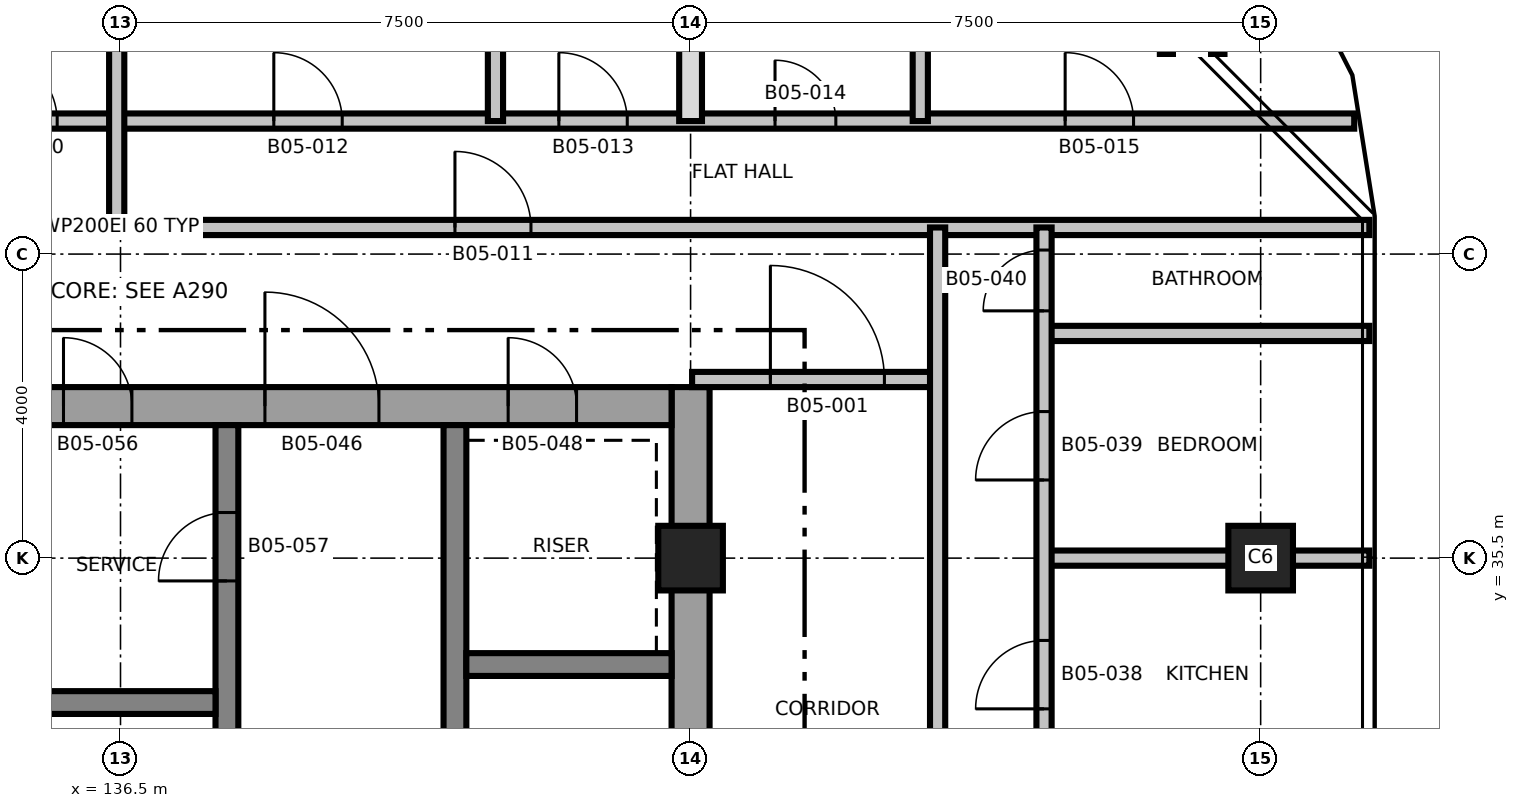
"""IFC4 building model, lengths in metres.
Left out: names, types, materials, properties, quantities, classifications, styles, units other than length and angle.
Written with IfcOpenShell. Run it as: python <this file> out.ifc"""

import sys

from ifc_helpers import new_model, si_unit, direction, frame, frame_2d, origin, origin_2d, place, context, subcontext, project, spatial, rectangle, extrude, element, fill, save


model = new_model("IFC4")
c1 = context("Model", 3, precision=1e-05, world=origin(), true_north=direction((0.0, 1.0)))
c2 = subcontext(c1, "Body", "Model", "MODEL_VIEW")
j1 = project(units=[si_unit("LENGTHUNIT", "METRE"), si_unit("PLANEANGLEUNIT", "RADIAN")], contexts=[c1])
p1 = place(None, origin())
s1 = spatial("IfcSite", under=j1, at=p1, CompositionType="ELEMENT")
p2 = place(p1, origin())
s2 = spatial("IfcBuilding", under=s1, at=p2, CompositionType="ELEMENT")
p3 = place(p2, frame((0.0, 0.0, 70.5)))
s3 = spatial("IfcBuildingStorey", under=s2, at=p3, CompositionType="ELEMENT", Elevation=70.5)
p4 = place(p3, frame((144.0, 24.25, 0.0), z_axis=(0.0, 0.0, 1.0), x_axis=(0.0, 1.0, 0.0)))
e1 = element("IfcWall", 1, at=p4, inside=s3, PredefinedType="SHEAR", context=c2, shape_type="SweptSolid", body=[
    extrude(rectangle(XDim=13.5, YDim=0.5, at=frame_2d((6.75, 0.0))), origin(), (0.0, 0.0, 1.0), 3.7),
])
p5 = place(p3, frame((128.75, 37.5, 0.0), z_axis=(0.0, 0.0, 1.0), x_axis=(1.0, 0.0, 0.0)))
e2 = element("IfcWall", 2, at=p5, inside=s3, PredefinedType="SHEAR", context=c2, shape_type="SweptSolid", body=[
    extrude(rectangle(XDim=15.0, YDim=0.5, at=frame_2d((7.5, 0.0))), origin(), (0.0, 0.0, 1.0), 3.7),
])
p6 = place(p5, frame((9.65, 0.0, 0.0)))
e3 = element("IfcOpeningElement", 3, at=p6, cuts=e2, PredefinedType="OPENING", context=c2, shape_type="SweptSolid", body=[
    extrude(rectangle(XDim=1.5, YDim=2.1, at=frame_2d((0.75, 1.05))), frame((0.0, 0.26, 0.0), z_axis=(0.0, -1.0, 0.0), x_axis=(1.0, 0.0, 0.0)), (0.0, 0.0, 1.0), 0.52),
])
p7 = place(p5, frame((12.85, 0.0, 0.0)))
e4 = element("IfcOpeningElement", 4, at=p7, cuts=e2, PredefinedType="OPENING", context=c2, shape_type="SweptSolid", body=[
    extrude(rectangle(XDim=0.9, YDim=2.1, at=frame_2d((0.45, 1.05))), frame((0.0, 0.26, 0.0), z_axis=(0.0, -1.0, 0.0), x_axis=(1.0, 0.0, 0.0)), (0.0, 0.0, 1.0), 0.52),
])
p8 = place(p5, frame((4.1, 0.0, 0.0)))
e5 = element("IfcOpeningElement", 5, at=p8, cuts=e2, PredefinedType="OPENING", context=c2, shape_type="SweptSolid", body=[
    extrude(rectangle(XDim=0.9, YDim=2.1, at=frame_2d((0.45, 1.05))), frame((0.0, 0.26, 0.0), z_axis=(0.0, -1.0, 0.0), x_axis=(1.0, 0.0, 0.0)), (0.0, 0.0, 1.0), 0.52),
])
p9 = place(p5, frame((7.0, 0.0, 0.0)))
e6 = element("IfcOpeningElement", 6, at=p9, cuts=e2, PredefinedType="OPENING", context=c2, shape_type="SweptSolid", body=[
    extrude(rectangle(XDim=0.9, YDim=2.1, at=frame_2d((0.45, 1.05))), frame((0.0, 0.26, 0.0), z_axis=(0.0, -1.0, 0.0), x_axis=(1.0, 0.0, 0.0)), (0.0, 0.0, 1.0), 0.52),
])
p10 = place(p3, frame((137.9, 24.75, 0.0), z_axis=(0.0, 0.0, 1.0), x_axis=(0.0, 1.0, 0.0)))
e7 = element("IfcWall", 7, at=p10, inside=s3, PredefinedType="SHEAR", context=c2, shape_type="SweptSolid", body=[
    extrude(rectangle(XDim=12.5, YDim=0.3, at=frame_2d((6.25, 0.0))), origin(), (0.0, 0.0, 1.0), 3.7),
])
p11 = place(p10, frame((3.95, 0.0, 0.0)))
e8 = element("IfcOpeningElement", 8, at=p11, cuts=e7, PredefinedType="OPENING", context=c2, shape_type="SweptSolid", body=[
    extrude(rectangle(XDim=1.5, YDim=2.1, at=frame_2d((0.75, 1.05))), frame((0.0, 0.16, 0.0), z_axis=(0.0, -1.0, 0.0), x_axis=(1.0, 0.0, 0.0)), (0.0, 0.0, 1.0), 0.32),
])
p12 = place(p10, frame((10.45, 0.0, 0.0)))
e9 = element("IfcOpeningElement", 9, at=p12, cuts=e7, PredefinedType="OPENING", context=c2, shape_type="SweptSolid", body=[
    extrude(rectangle(XDim=0.9, YDim=2.1, at=frame_2d((0.45, 1.05))), frame((0.0, 0.16, 0.0), z_axis=(0.0, -1.0, 0.0), x_axis=(1.0, 0.0, 0.0)), (0.0, 0.0, 1.0), 0.32),
])
p13 = place(p3, frame((140.9, 24.75, 0.0), z_axis=(0.0, 0.0, 1.0), x_axis=(0.0, 1.0, 0.0)))
e10 = element("IfcWall", 10, at=p13, inside=s3, PredefinedType="SHEAR", context=c2, shape_type="SweptSolid", body=[
    extrude(rectangle(XDim=12.5, YDim=0.3, at=frame_2d((6.25, 0.0))), origin(), (0.0, 0.0, 1.0), 3.7),
])
p14 = place(p13, frame((5.9, 0.0, 0.0)))
e11 = element("IfcOpeningElement", 11, at=p14, cuts=e10, PredefinedType="OPENING", context=c2, shape_type="SweptSolid", body=[
    extrude(rectangle(XDim=1.2, YDim=2.1, at=frame_2d((0.6, 1.05))), frame((0.0, 0.16, 0.0), z_axis=(0.0, -1.0, 0.0), x_axis=(1.0, 0.0, 0.0)), (0.0, 0.0, 1.0), 0.32),
])
p15 = place(p3, frame((132.25, 33.6, 0.0), z_axis=(0.0, 0.0, 1.0), x_axis=(1.0, 0.0, 0.0)))
e12 = element("IfcWall", 12, at=p15, inside=s3, PredefinedType="SHEAR", context=c2, shape_type="SweptSolid", body=[
    extrude(rectangle(XDim=5.5, YDim=0.3, at=frame_2d((2.75, 0.0))), origin(), (0.0, 0.0, 1.0), 3.7),
])
p16 = place(p3, frame((141.05, 34.1, 0.0), z_axis=(0.0, 0.0, 1.0), x_axis=(1.0, 0.0, 0.0)))
e13 = element("IfcWall", 13, at=p16, inside=s3, PredefinedType="SHEAR", context=c2, shape_type="SweptSolid", body=[
    extrude(rectangle(XDim=2.7, YDim=0.3, at=frame_2d((1.35, 0.0))), origin(), (0.0, 0.0, 1.0), 3.7),
])
for number, where, z_axis, x_axis in (
    (14, (144.0, 35.5, 0.0), (0.0, 0.0, 1.0), (1.0, 0.0, 0.0)),
    (15, (151.5, 35.5, 0.0), (0.0, 0.0, 1.0), (1.0, 0.0, 0.0)),
    (16, (150.599, 42.558, 0.0), (0.0, 0.0, 1.0), (1.0, 0.0, 0.0)),
):
    element("IfcColumn", number, at=place(p3, frame(where, z_axis=z_axis, x_axis=x_axis)), inside=s3, PredefinedType="COLUMN", context=c2, shape_type="SweptSolid", body=[
        extrude(rectangle(XDim=0.85, YDim=0.85, at=origin_2d()), origin(), (0.0, 0.0, 1.0), 3.7),
    ])
p17 = place(p3, frame((148.65, 35.5, 0.0), z_axis=(0.0, 0.0, 1.0), x_axis=(1.0, 0.0, 0.0)))
e17 = element("IfcWall", 17, at=p17, inside=s3, PredefinedType="PARTITIONING", context=c2, shape_type="SweptSolid", body=[
    extrude(rectangle(XDim=4.28, YDim=0.2, at=frame_2d((2.14, 0.0))), origin(), (0.0, 0.0, 1.0), 3.4),
])
p18 = place(p3, frame((144.02, 37.85, 0.0), z_axis=(0.0, 0.0, 1.0), x_axis=(1.0, 0.0, 0.0)))
e18 = element("IfcWall", 18, at=p18, inside=s3, PredefinedType="PARTITIONING", context=c2, shape_type="SweptSolid", body=[
    extrude(rectangle(XDim=3.23, YDim=0.2, at=frame_2d((1.615, 0.0))), origin(), (0.0, 0.0, 1.0), 3.4),
])
p19 = place(p18, frame((1.03, 0.0, 0.0)))
e19 = element("IfcOpeningElement", 19, at=p19, cuts=e18, PredefinedType="OPENING", context=c2, shape_type="SweptSolid", body=[
    extrude(rectangle(XDim=1.5, YDim=2.1, at=frame_2d((0.75, 1.05))), frame((0.0, 0.11, 0.0), z_axis=(0.0, -1.0, 0.0), x_axis=(1.0, 0.0, 0.0)), (0.0, 0.0, 1.0), 0.22),
])
p20 = place(p3, frame((148.65, 38.456, 0.0), z_axis=(0.0, 0.0, 1.0), x_axis=(1.0, 0.0, 0.0)))
e20 = element("IfcWall", 20, at=p20, inside=s3, PredefinedType="PARTITIONING", context=c2, shape_type="SweptSolid", body=[
    extrude(rectangle(XDim=4.28, YDim=0.2, at=frame_2d((2.14, 0.0))), origin(), (0.0, 0.0, 1.0), 3.4),
])
p21 = place(p3, frame((120.07, 39.85, 0.0), z_axis=(0.0, 0.0, 1.0), x_axis=(1.0, 0.0, 0.0)))
e21 = element("IfcWall", 21, at=p21, inside=s3, PredefinedType="PARTITIONING", context=c2, shape_type="SweptSolid", body=[
    extrude(rectangle(XDim=32.86, YDim=0.2, at=frame_2d((16.43, 0.0))), origin(), (0.0, 0.0, 1.0), 3.4),
])
p22 = place(p21, frame((11.03, 0.0, 0.0)))
e22 = element("IfcOpeningElement", 22, at=p22, cuts=e21, PredefinedType="OPENING", context=c2, shape_type="SweptSolid", body=[
    extrude(rectangle(XDim=1.0, YDim=2.1, at=frame_2d((0.5, 1.05))), frame((0.0, 0.11, 0.0), z_axis=(0.0, -1.0, 0.0), x_axis=(1.0, 0.0, 0.0)), (0.0, 0.0, 1.0), 0.22),
])
p23 = place(p21, frame((20.83, 0.0, 0.0)))
e23 = element("IfcOpeningElement", 23, at=p23, cuts=e21, PredefinedType="OPENING", context=c2, shape_type="SweptSolid", body=[
    extrude(rectangle(XDim=1.0, YDim=2.1, at=frame_2d((0.5, 1.05))), frame((0.0, 0.11, 0.0), z_axis=(0.0, -1.0, 0.0), x_axis=(1.0, 0.0, 0.0)), (0.0, 0.0, 1.0), 0.22),
])
p24 = place(p3, frame((120.269, 41.25, 0.0), z_axis=(0.0, 0.0, 1.0), x_axis=(1.0, 0.0, 0.0)))
e24 = element("IfcWall", 24, at=p24, inside=s3, PredefinedType="PARTITIONING", context=c2, shape_type="SweptSolid", body=[
    extrude(rectangle(XDim=32.462, YDim=0.2, at=frame_2d((16.231, 0.0))), origin(), (0.0, 0.0, 1.0), 3.4),
])
p25 = place(p24, frame((0.414, 0.0, 0.0)))
e25 = element("IfcOpeningElement", 25, at=p25, cuts=e24, PredefinedType="OPENING", context=c2, shape_type="SweptSolid", body=[
    extrude(rectangle(XDim=0.9, YDim=2.1, at=frame_2d((0.45, 1.05))), frame((0.0, 0.11, 0.0), z_axis=(0.0, -1.0, 0.0), x_axis=(1.0, 0.0, 0.0)), (0.0, 0.0, 1.0), 0.22),
])
p26 = place(p24, frame((4.581, 0.0, 0.0)))
e26 = element("IfcOpeningElement", 26, at=p26, cuts=e24, PredefinedType="OPENING", context=c2, shape_type="SweptSolid", body=[
    extrude(rectangle(XDim=0.9, YDim=2.1, at=frame_2d((0.45, 1.05))), frame((0.0, 0.11, 0.0), z_axis=(0.0, -1.0, 0.0), x_axis=(1.0, 0.0, 0.0)), (0.0, 0.0, 1.0), 0.22),
])
p27 = place(p24, frame((7.381, 0.0, 0.0)))
e27 = element("IfcOpeningElement", 27, at=p27, cuts=e24, PredefinedType="OPENING", context=c2, shape_type="SweptSolid", body=[
    extrude(rectangle(XDim=0.8, YDim=2.1, at=frame_2d((0.4, 1.05))), frame((0.0, 0.11, 0.0), z_axis=(0.0, -1.0, 0.0), x_axis=(1.0, 0.0, 0.0)), (0.0, 0.0, 1.0), 0.22),
])
p28 = place(p24, frame((10.748, 0.0, 0.0)))
e28 = element("IfcOpeningElement", 28, at=p28, cuts=e24, PredefinedType="OPENING", context=c2, shape_type="SweptSolid", body=[
    extrude(rectangle(XDim=0.9, YDim=2.1, at=frame_2d((0.45, 1.05))), frame((0.0, 0.11, 0.0), z_axis=(0.0, -1.0, 0.0), x_axis=(1.0, 0.0, 0.0)), (0.0, 0.0, 1.0), 0.22),
])
p29 = place(p24, frame((14.498, 0.0, 0.0)))
e29 = element("IfcOpeningElement", 29, at=p29, cuts=e24, PredefinedType="OPENING", context=c2, shape_type="SweptSolid", body=[
    extrude(rectangle(XDim=0.9, YDim=2.1, at=frame_2d((0.45, 1.05))), frame((0.0, 0.11, 0.0), z_axis=(0.0, -1.0, 0.0), x_axis=(1.0, 0.0, 0.0)), (0.0, 0.0, 1.0), 0.22),
])
p30 = place(p24, frame((18.248, 0.0, 0.0)))
e30 = element("IfcOpeningElement", 30, at=p30, cuts=e24, PredefinedType="OPENING", context=c2, shape_type="SweptSolid", body=[
    extrude(rectangle(XDim=0.9, YDim=2.1, at=frame_2d((0.45, 1.05))), frame((0.0, 0.11, 0.0), z_axis=(0.0, -1.0, 0.0), x_axis=(1.0, 0.0, 0.0)), (0.0, 0.0, 1.0), 0.22),
])
p31 = place(p24, frame((21.998, 0.0, 0.0)))
e31 = element("IfcOpeningElement", 31, at=p31, cuts=e24, PredefinedType="OPENING", context=c2, shape_type="SweptSolid", body=[
    extrude(rectangle(XDim=0.9, YDim=2.1, at=frame_2d((0.45, 1.05))), frame((0.0, 0.11, 0.0), z_axis=(0.0, -1.0, 0.0), x_axis=(1.0, 0.0, 0.0)), (0.0, 0.0, 1.0), 0.22),
])
p32 = place(p24, frame((24.842, 0.0, 0.0)))
e32 = element("IfcOpeningElement", 32, at=p32, cuts=e24, PredefinedType="OPENING", context=c2, shape_type="SweptSolid", body=[
    extrude(rectangle(XDim=0.8, YDim=2.1, at=frame_2d((0.4, 1.05))), frame((0.0, 0.11, 0.0), z_axis=(0.0, -1.0, 0.0), x_axis=(1.0, 0.0, 0.0)), (0.0, 0.0, 1.0), 0.22),
])
p33 = place(p24, frame((28.659, 0.0, 0.0)))
e33 = element("IfcOpeningElement", 33, at=p33, cuts=e24, PredefinedType="OPENING", context=c2, shape_type="SweptSolid", body=[
    extrude(rectangle(XDim=0.9, YDim=2.1, at=frame_2d((0.45, 1.05))), frame((0.0, 0.11, 0.0), z_axis=(0.0, -1.0, 0.0), x_axis=(1.0, 0.0, 0.0)), (0.0, 0.0, 1.0), 0.22),
])
p34 = place(p3, frame((136.45, 39.85, 0.0), z_axis=(0.0, 0.0, 1.0), x_axis=(0.0, 1.0, 0.0)))
e34 = element("IfcWall", 34, at=p34, inside=s3, PredefinedType="PARTITIONING", context=c2, shape_type="SweptSolid", body=[
    extrude(rectangle(XDim=6.08, YDim=0.2, at=frame_2d((3.04, 0.0))), origin(), (0.0, 0.0, 1.0), 3.4),
])
p35 = place(p3, frame((141.433, 41.25, 0.0), z_axis=(0.0, 0.0, 1.0), x_axis=(0.0, 1.0, 0.0)))
e35 = element("IfcWall", 35, at=p35, inside=s3, PredefinedType="PARTITIONING", context=c2, shape_type="SweptSolid", body=[
    extrude(rectangle(XDim=4.68, YDim=0.2, at=frame_2d((2.34, 0.0))), origin(), (0.0, 0.0, 1.0), 3.4),
])
p36 = place(p3, frame((144.0, 41.25, 0.0), z_axis=(0.0, 0.0, 1.0), x_axis=(0.0, 1.0, 0.0)))
e36 = element("IfcWall", 36, at=p36, inside=s3, PredefinedType="PARTITIONING", context=c2, shape_type="SweptSolid", body=[
    extrude(rectangle(XDim=4.68, YDim=0.3, at=frame_2d((2.34, 0.0))), origin(), (0.0, 0.0, 1.0), 3.4),
])
p37 = place(p3, frame((147.022, 41.25, 0.0), z_axis=(0.0, 0.0, 1.0), x_axis=(0.0, 1.0, 0.0)))
e37 = element("IfcWall", 37, at=p37, inside=s3, PredefinedType="PARTITIONING", context=c2, shape_type="SweptSolid", body=[
    extrude(rectangle(XDim=4.676, YDim=0.2, at=frame_2d((2.338, 0.0))), origin(), (0.0, 0.0, 1.0), 3.4),
])
p38 = place(p3, frame((147.25, 22.15, 0.0), z_axis=(0.0, 0.0, 1.0), x_axis=(0.0, 1.0, 0.0)))
e38 = element("IfcWall", 38, at=p38, inside=s3, PredefinedType="PARTITIONING", context=c2, shape_type="SweptSolid", body=[
    extrude(rectangle(XDim=17.7, YDim=0.2, at=frame_2d((8.85, 0.0))), origin(), (0.0, 0.0, 1.0), 3.4),
])
p39 = place(p38, frame((2.65, 0.0, 0.0)))
e39 = element("IfcOpeningElement", 39, at=p39, cuts=e38, PredefinedType="OPENING", context=c2, shape_type="SweptSolid", body=[
    extrude(rectangle(XDim=1.0, YDim=2.1, at=frame_2d((0.5, 1.05))), frame((0.0, 0.11, 0.0), z_axis=(0.0, -1.0, 0.0), x_axis=(1.0, 0.0, 0.0)), (0.0, 0.0, 1.0), 0.22),
])
p40 = place(p3, frame((148.65, 22.15, 0.0), z_axis=(0.0, 0.0, 1.0), x_axis=(0.0, 1.0, 0.0)))
e40 = element("IfcWall", 40, at=p40, inside=s3, PredefinedType="PARTITIONING", context=c2, shape_type="SweptSolid", body=[
    extrude(rectangle(XDim=17.7, YDim=0.2, at=frame_2d((8.85, 0.0))), origin(), (0.0, 0.0, 1.0), 3.4),
])
p41 = place(p40, frame((1.725, 0.0, 0.0)))
e41 = element("IfcOpeningElement", 41, at=p41, cuts=e40, PredefinedType="OPENING", context=c2, shape_type="SweptSolid", body=[
    extrude(rectangle(XDim=0.9, YDim=2.1, at=frame_2d((0.45, 1.05))), frame((0.0, 0.11, 0.0), z_axis=(0.0, -1.0, 0.0), x_axis=(1.0, 0.0, 0.0)), (0.0, 0.0, 1.0), 0.22),
])
p42 = place(p40, frame((6.867, 0.0, 0.0)))
e42 = element("IfcOpeningElement", 42, at=p42, cuts=e40, PredefinedType="OPENING", context=c2, shape_type="SweptSolid", body=[
    extrude(rectangle(XDim=0.9, YDim=2.1, at=frame_2d((0.45, 1.05))), frame((0.0, 0.11, 0.0), z_axis=(0.0, -1.0, 0.0), x_axis=(1.0, 0.0, 0.0)), (0.0, 0.0, 1.0), 0.22),
])
p43 = place(p40, frame((11.367, 0.0, 0.0)))
e43 = element("IfcOpeningElement", 43, at=p43, cuts=e40, PredefinedType="OPENING", context=c2, shape_type="SweptSolid", body=[
    extrude(rectangle(XDim=0.9, YDim=2.1, at=frame_2d((0.45, 1.05))), frame((0.0, 0.11, 0.0), z_axis=(0.0, -1.0, 0.0), x_axis=(1.0, 0.0, 0.0)), (0.0, 0.0, 1.0), 0.22),
])
p44 = place(p40, frame((14.378, 0.0, 0.0)))
e44 = element("IfcOpeningElement", 44, at=p44, cuts=e40, PredefinedType="OPENING", context=c2, shape_type="SweptSolid", body=[
    extrude(rectangle(XDim=0.9, YDim=2.1, at=frame_2d((0.45, 1.05))), frame((0.0, 0.11, 0.0), z_axis=(0.0, -1.0, 0.0), x_axis=(1.0, 0.0, 0.0)), (0.0, 0.0, 1.0), 0.22),
])
p45 = place(p40, frame((16.603, 0.0, 0.0)))
e45 = element("IfcOpeningElement", 45, at=p45, cuts=e40, PredefinedType="OPENING", context=c2, shape_type="SweptSolid", body=[
    extrude(rectangle(XDim=0.8, YDim=2.1, at=frame_2d((0.4, 1.05))), frame((0.0, 0.11, 0.0), z_axis=(0.0, -1.0, 0.0), x_axis=(1.0, 0.0, 0.0)), (0.0, 0.0, 1.0), 0.22),
])
p46 = place(p19, origin())
e46 = element("IfcDoor", 46, at=p46, inside=s3, OperationType="SINGLE_SWING_LEFT", PredefinedType="DOOR", context=c2, shape_type="SweptSolid", body=[
    extrude(rectangle(XDim=1.5, YDim=2.1, at=frame_2d((0.75, 1.05))), frame((0.0, 0.025, 0.0), z_axis=(0.0, -1.0, 0.0), x_axis=(1.0, 0.0, 0.0)), (0.0, 0.0, 1.0), 0.05),
])
fill(e19, e46)
p47 = place(p29, origin())
e47 = element("IfcDoor", 47, at=p47, inside=s3, OperationType="SINGLE_SWING_RIGHT", PredefinedType="DOOR", context=c2, shape_type="SweptSolid", body=[
    extrude(rectangle(XDim=0.9, YDim=2.1, at=frame_2d((0.45, 1.05))), frame((0.0, 0.025, 0.0), z_axis=(0.0, -1.0, 0.0), x_axis=(1.0, 0.0, 0.0)), (0.0, 0.0, 1.0), 0.05),
])
fill(e29, e47)
p48 = place(p23, origin())
e48 = element("IfcDoor", 48, at=p48, inside=s3, OperationType="SINGLE_SWING_LEFT", PredefinedType="DOOR", context=c2, shape_type="SweptSolid", body=[
    extrude(rectangle(XDim=1.0, YDim=2.1, at=frame_2d((0.5, 1.05))), frame((0.0, 0.025, 0.0), z_axis=(0.0, -1.0, 0.0), x_axis=(1.0, 0.0, 0.0)), (0.0, 0.0, 1.0), 0.05),
])
fill(e23, e48)
p49 = place(p30, origin())
e49 = element("IfcDoor", 49, at=p49, inside=s3, OperationType="SINGLE_SWING_RIGHT", PredefinedType="DOOR", context=c2, shape_type="SweptSolid", body=[
    extrude(rectangle(XDim=0.9, YDim=2.1, at=frame_2d((0.45, 1.05))), frame((0.0, 0.025, 0.0), z_axis=(0.0, -1.0, 0.0), x_axis=(1.0, 0.0, 0.0)), (0.0, 0.0, 1.0), 0.05),
])
fill(e30, e49)
p50 = place(p31, origin())
e50 = element("IfcDoor", 50, at=p50, inside=s3, OperationType="SINGLE_SWING_LEFT", PredefinedType="DOOR", context=c2, shape_type="SweptSolid", body=[
    extrude(rectangle(XDim=0.9, YDim=2.1, at=frame_2d((0.45, 1.05))), frame((0.0, 0.025, 0.0), z_axis=(0.0, -1.0, 0.0), x_axis=(1.0, 0.0, 0.0)), (0.0, 0.0, 1.0), 0.05),
])
fill(e31, e50)
p51 = place(p32, origin())
e51 = element("IfcDoor", 51, at=p51, inside=s3, OperationType="SINGLE_SWING_RIGHT", PredefinedType="DOOR", context=c2, shape_type="SweptSolid", body=[
    extrude(rectangle(XDim=0.8, YDim=2.1, at=frame_2d((0.4, 1.05))), frame((0.0, 0.025, 0.0), z_axis=(0.0, -1.0, 0.0), x_axis=(1.0, 0.0, 0.0)), (0.0, 0.0, 1.0), 0.05),
])
fill(e32, e51)
p52 = place(p33, origin())
e52 = element("IfcDoor", 52, at=p52, inside=s3, OperationType="SINGLE_SWING_LEFT", PredefinedType="DOOR", context=c2, shape_type="SweptSolid", body=[
    extrude(rectangle(XDim=0.9, YDim=2.1, at=frame_2d((0.45, 1.05))), frame((0.0, 0.025, 0.0), z_axis=(0.0, -1.0, 0.0), x_axis=(1.0, 0.0, 0.0)), (0.0, 0.0, 1.0), 0.05),
])
fill(e33, e52)
p53 = place(p43, origin())
e53 = element("IfcDoor", 53, at=p53, inside=s3, OperationType="SINGLE_SWING_RIGHT", PredefinedType="DOOR", context=c2, shape_type="SweptSolid", body=[
    extrude(rectangle(XDim=0.9, YDim=2.1, at=frame_2d((0.45, 1.05))), frame((0.0, 0.025, 0.0), z_axis=(0.0, -1.0, 0.0), x_axis=(1.0, 0.0, 0.0)), (0.0, 0.0, 1.0), 0.05),
])
fill(e43, e53)
p54 = place(p44, origin())
e54 = element("IfcDoor", 54, at=p54, inside=s3, OperationType="SINGLE_SWING_LEFT", PredefinedType="DOOR", context=c2, shape_type="SweptSolid", body=[
    extrude(rectangle(XDim=0.9, YDim=2.1, at=frame_2d((0.45, 1.05))), frame((0.0, 0.025, 0.0), z_axis=(0.0, -1.0, 0.0), x_axis=(1.0, 0.0, 0.0)), (0.0, 0.0, 1.0), 0.05),
])
fill(e44, e54)
p55 = place(p45, origin())
e55 = element("IfcDoor", 55, at=p55, inside=s3, OperationType="SINGLE_SWING_RIGHT", PredefinedType="DOOR", context=c2, shape_type="SweptSolid", body=[
    extrude(rectangle(XDim=0.8, YDim=2.1, at=frame_2d((0.4, 1.05))), frame((0.0, 0.025, 0.0), z_axis=(0.0, -1.0, 0.0), x_axis=(1.0, 0.0, 0.0)), (0.0, 0.0, 1.0), 0.05),
])
fill(e45, e55)
p56 = place(p6, origin())
e56 = element("IfcDoor", 56, at=p56, inside=s3, OperationType="SINGLE_SWING_RIGHT", PredefinedType="DOOR", context=c2, shape_type="SweptSolid", body=[
    extrude(rectangle(XDim=1.5, YDim=2.1, at=frame_2d((0.75, 1.05))), frame((0.0, 0.025, 0.0), z_axis=(0.0, -1.0, 0.0), x_axis=(1.0, 0.0, 0.0)), (0.0, 0.0, 1.0), 0.05),
])
fill(e3, e56)
p57 = place(p7, origin())
e57 = element("IfcDoor", 57, at=p57, inside=s3, OperationType="SINGLE_SWING_RIGHT", PredefinedType="DOOR", context=c2, shape_type="SweptSolid", body=[
    extrude(rectangle(XDim=0.9, YDim=2.1, at=frame_2d((0.45, 1.05))), frame((0.0, 0.025, 0.0), z_axis=(0.0, -1.0, 0.0), x_axis=(1.0, 0.0, 0.0)), (0.0, 0.0, 1.0), 0.05),
])
fill(e4, e57)
p58 = place(p9, origin())
e58 = element("IfcDoor", 58, at=p58, inside=s3, OperationType="SINGLE_SWING_RIGHT", PredefinedType="DOOR", context=c2, shape_type="SweptSolid", body=[
    extrude(rectangle(XDim=0.9, YDim=2.1, at=frame_2d((0.45, 1.05))), frame((0.0, 0.025, 0.0), z_axis=(0.0, -1.0, 0.0), x_axis=(1.0, 0.0, 0.0)), (0.0, 0.0, 1.0), 0.05),
])
fill(e6, e58)
p59 = place(p12, origin())
e59 = element("IfcDoor", 59, at=p59, inside=s3, OperationType="SINGLE_SWING_RIGHT", PredefinedType="DOOR", context=c2, shape_type="SweptSolid", body=[
    extrude(rectangle(XDim=0.9, YDim=2.1, at=frame_2d((0.45, 1.05))), frame((0.0, 0.025, 0.0), z_axis=(0.0, -1.0, 0.0), x_axis=(1.0, 0.0, 0.0)), (0.0, 0.0, 1.0), 0.05),
])
fill(e9, e59)
save(model, sys.argv[1])
